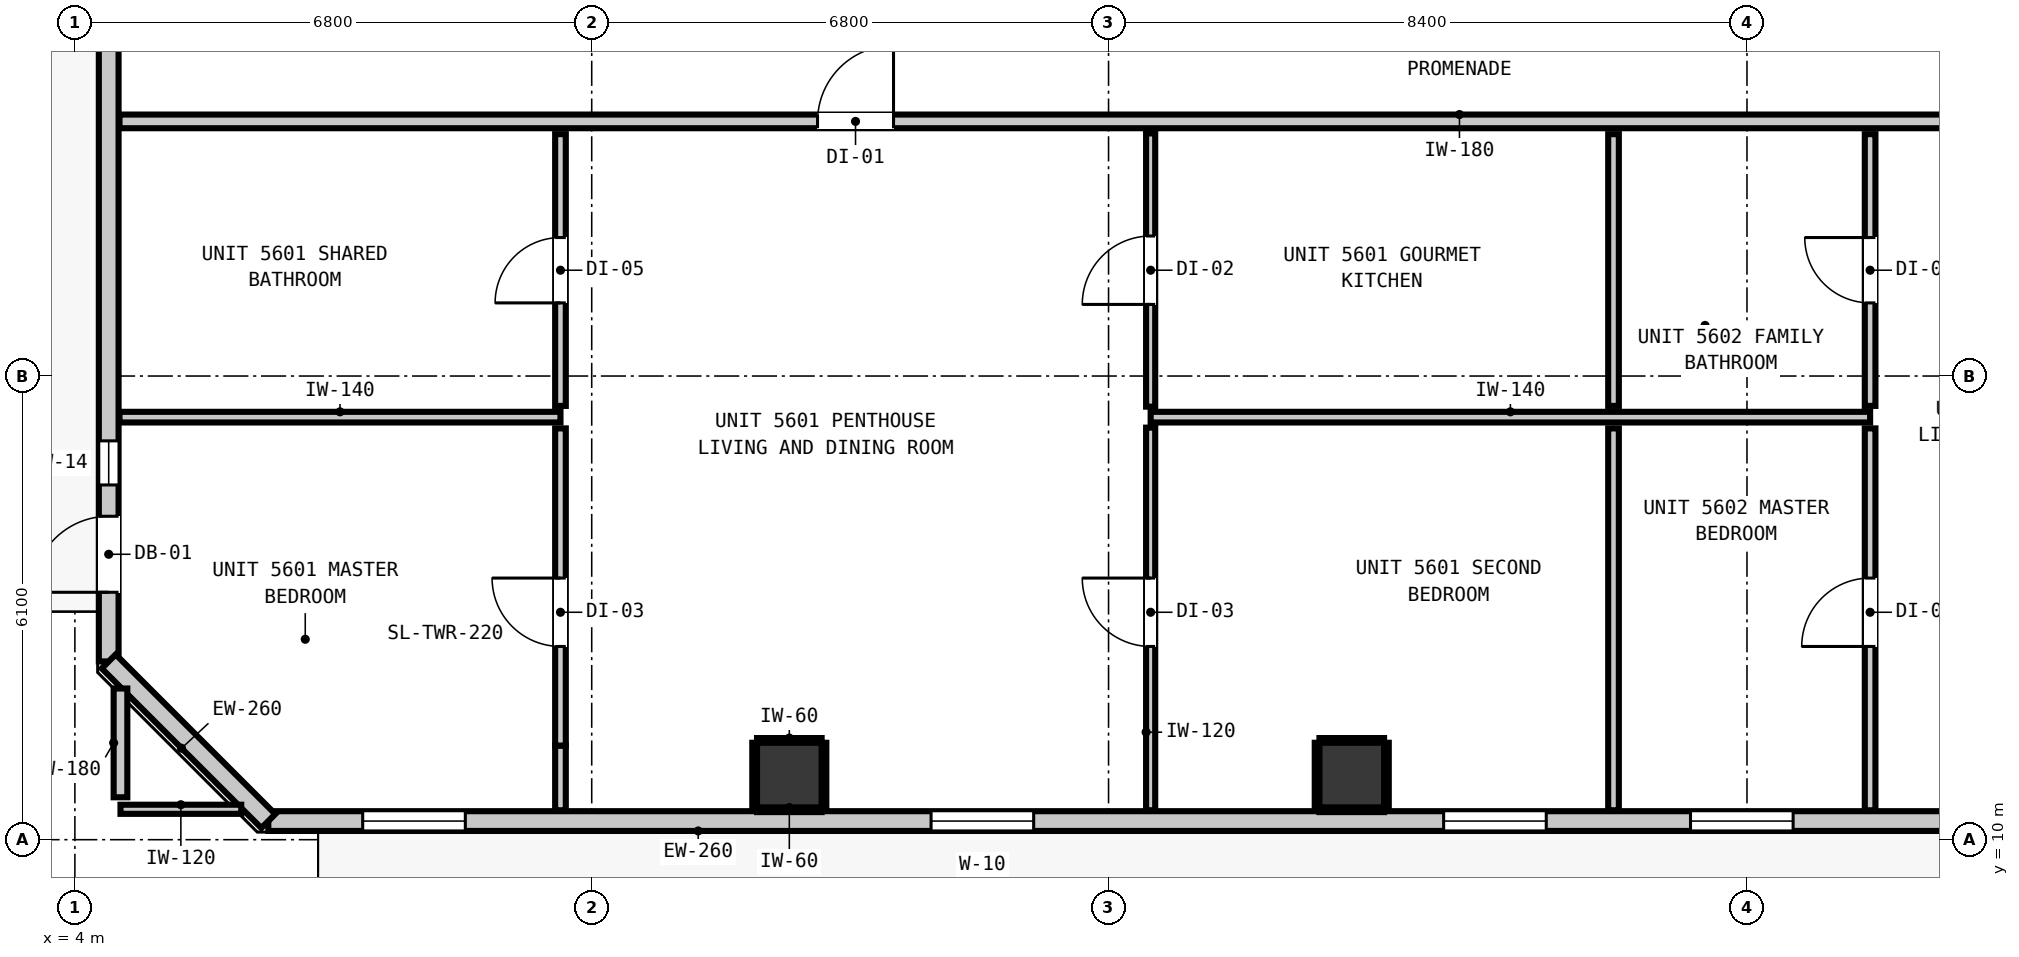
"""IFC4 building model, lengths in metres.
Left out: names, types, materials, properties, quantities, classifications, styles, units other than length and angle.
Written with IfcOpenShell. Run it as: python <this file> out.ifc"""

import sys

from ifc_helpers import new_model, si_unit, direction, frame, frame_2d, origin, origin_2d, place, context, subcontext, project, spatial, rectangle, extrude, element, fill, save


model = new_model("IFC4")
c1 = context("Model", 3, precision=1e-05, world=origin(), true_north=direction((0.0, 1.0)))
c2 = subcontext(c1, "Body", "Model", "MODEL_VIEW")
j1 = project(units=[si_unit("LENGTHUNIT", "METRE"), si_unit("PLANEANGLEUNIT", "RADIAN")], contexts=[c1])
p1 = place(None, origin())
s1 = spatial("IfcSite", under=j1, at=p1, CompositionType="ELEMENT")
p2 = place(p1, origin())
s2 = spatial("IfcBuilding", under=s1, at=p2, CompositionType="ELEMENT")
p3 = place(p2, frame((0.0, 0.0, 193.48)))
s3 = spatial("IfcBuildingStorey", under=s2, at=p3, CompositionType="ELEMENT", Elevation=193.48)
for number, where, z_axis, x_axis in (
    (1, (13.4, 10.85, 0.0), (0.0, 0.0, 1.0), (1.0, 0.0, 0.0)),
    (2, (20.8, 10.85, 0.0), (0.0, 0.0, 1.0), (1.0, 0.0, 0.0)),
):
    element("IfcColumn", number, at=place(p3, frame(where, z_axis=z_axis, x_axis=x_axis)), inside=s3, PredefinedType="COLUMN", context=c2, shape_type="SweptSolid", body=[
        extrude(rectangle(XDim=0.85, YDim=0.85, at=origin_2d()), origin(), (0.0, 0.0, 1.0), 3.32),
    ])
p4 = place(p3, frame((4.445, 12.345, 0.0), z_axis=(0.0, 0.0, 1.0), x_axis=(0.0, 1.0, 0.0)))
e3 = element("IfcWall", 3, at=p4, inside=s3, PredefinedType="STANDARD", context=c2, shape_type="SweptSolid", body=[
    extrude(rectangle(XDim=30.31, YDim=0.26, at=frame_2d((15.155, 0.0))), origin(), (0.0, 0.0, 1.0), 3.1),
])
p5 = place(p4, frame((0.91, 0.0, 0.0)))
e4 = element("IfcOpeningElement", 4, at=p5, cuts=e3, PredefinedType="OPENING", context=c2, shape_type="SweptSolid", body=[
    extrude(rectangle(XDim=1.0, YDim=2.15, at=frame_2d((0.5, 1.075))), frame((0.0, 0.14, 0.0), z_axis=(0.0, -1.0, 0.0), x_axis=(1.0, 0.0, 0.0)), (0.0, 0.0, 1.0), 0.28),
])
p6 = place(p4, frame((2.322, 0.0, 0.85)))
e5 = element("IfcOpeningElement", 5, at=p6, cuts=e3, PredefinedType="OPENING", context=c2, shape_type="SweptSolid", body=[
    extrude(rectangle(XDim=0.58, YDim=1.5, at=frame_2d((0.29, 0.75))), frame((0.0, 0.14, 0.0), z_axis=(0.0, -1.0, 0.0), x_axis=(1.0, 0.0, 0.0)), (0.0, 0.0, 1.0), 0.28),
])
p7 = place(p3, frame((39.255, 10.245, 0.0), z_axis=(0.0, 0.0, 1.0), x_axis=(-1.0, 0.0, 0.0)))
e6 = element("IfcWall", 6, at=p7, inside=s3, PredefinedType="STANDARD", context=c2, shape_type="SweptSolid", body=[
    extrude(rectangle(XDim=32.71, YDim=0.26, at=frame_2d((16.355, 0.0))), origin(), (0.0, 0.0, 1.0), 3.1),
])
p8 = place(p7, frame((3.721, 0.0, 0.0)))
e7 = element("IfcOpeningElement", 7, at=p8, cuts=e6, PredefinedType="OPENING", context=c2, shape_type="SweptSolid", body=[
    extrude(rectangle(XDim=1.0, YDim=2.15, at=frame_2d((0.5, 1.075))), frame((0.0, 0.14, 0.0), z_axis=(0.0, -1.0, 0.0), x_axis=(1.0, 0.0, 0.0)), (0.0, 0.0, 1.0), 0.28),
])
p9 = place(p7, frame((22.64, 0.0, 0.85)))
e8 = element("IfcOpeningElement", 8, at=p9, cuts=e6, PredefinedType="OPENING", context=c2, shape_type="SweptSolid", body=[
    extrude(rectangle(XDim=1.35, YDim=1.85, at=frame_2d((0.675, 0.925))), frame((0.0, 0.14, 0.0), z_axis=(0.0, -1.0, 0.0), x_axis=(1.0, 0.0, 0.0)), (0.0, 0.0, 1.0), 0.28),
])
p10 = place(p7, frame((30.118, 0.0, 0.85)))
e9 = element("IfcOpeningElement", 9, at=p10, cuts=e6, PredefinedType="OPENING", context=c2, shape_type="SweptSolid", body=[
    extrude(rectangle(XDim=1.35, YDim=1.85, at=frame_2d((0.675, 0.925))), frame((0.0, 0.14, 0.0), z_axis=(0.0, -1.0, 0.0), x_axis=(1.0, 0.0, 0.0)), (0.0, 0.0, 1.0), 0.28),
])
p11 = place(p7, frame((15.896, 0.0, 0.85)))
e10 = element("IfcOpeningElement", 10, at=p11, cuts=e6, PredefinedType="OPENING", context=c2, shape_type="SweptSolid", body=[
    extrude(rectangle(XDim=1.35, YDim=1.85, at=frame_2d((0.675, 0.925))), frame((0.0, 0.14, 0.0), z_axis=(0.0, -1.0, 0.0), x_axis=(1.0, 0.0, 0.0)), (0.0, 0.0, 1.0), 0.28),
])
p12 = place(p7, frame((7.464, 0.0, 0.85)))
e11 = element("IfcOpeningElement", 11, at=p12, cuts=e6, PredefinedType="OPENING", context=c2, shape_type="SweptSolid", body=[
    extrude(rectangle(XDim=1.35, YDim=1.85, at=frame_2d((0.675, 0.925))), frame((0.0, 0.14, 0.0), z_axis=(0.0, -1.0, 0.0), x_axis=(1.0, 0.0, 0.0)), (0.0, 0.0, 1.0), 0.28),
])
p13 = place(p7, frame((12.648, 0.0, 0.85)))
e12 = element("IfcOpeningElement", 12, at=p13, cuts=e6, PredefinedType="OPENING", context=c2, shape_type="SweptSolid", body=[
    extrude(rectangle(XDim=1.35, YDim=1.85, at=frame_2d((0.675, 0.925))), frame((0.0, 0.14, 0.0), z_axis=(0.0, -1.0, 0.0), x_axis=(1.0, 0.0, 0.0)), (0.0, 0.0, 1.0), 0.28),
])
p14 = place(p7, frame((5.159, 0.0, 0.85)))
e13 = element("IfcOpeningElement", 13, at=p14, cuts=e6, PredefinedType="OPENING", context=c2, shape_type="SweptSolid", body=[
    extrude(rectangle(XDim=1.05, YDim=1.65, at=frame_2d((0.525, 0.825))), frame((0.0, 0.14, 0.0), z_axis=(0.0, -1.0, 0.0), x_axis=(1.0, 0.0, 0.0)), (0.0, 0.0, 1.0), 0.28),
])
p15 = place(p7, frame((0.293, 0.0, 0.85)))
e14 = element("IfcOpeningElement", 14, at=p15, cuts=e6, PredefinedType="OPENING", context=c2, shape_type="SweptSolid", body=[
    extrude(rectangle(XDim=0.58, YDim=1.5, at=frame_2d((0.29, 0.75))), frame((0.0, 0.14, 0.0), z_axis=(0.0, -1.0, 0.0), x_axis=(1.0, 0.0, 0.0)), (0.0, 0.0, 1.0), 0.28),
])
p16 = place(p3, frame((6.545, 10.245, 0.0), z_axis=(0.0, 0.0, 1.0), x_axis=(-0.707106781187, 0.707106781187, 0.0)))
e15 = element("IfcWall", 15, at=p16, inside=s3, PredefinedType="STANDARD", context=c2, shape_type="SweptSolid", body=[
    extrude(rectangle(XDim=2.97, YDim=0.26, at=frame_2d((1.485, 0.0))), origin(), (0.0, 0.0, 1.0), 3.1),
])
p17 = place(p3, frame((4.587, 19.45, 0.0), z_axis=(0.0, 0.0, 1.0), x_axis=(1.0, 0.0, 0.0)))
e16 = element("IfcWall", 16, at=p17, inside=s3, PredefinedType="PARTITIONING", context=c2, shape_type="SweptSolid", body=[
    extrude(rectangle(XDim=36.626, YDim=0.18, at=frame_2d((18.313, 0.0))), origin(), (0.0, 0.0, 1.0), 3.1),
])
p18 = place(p17, frame((9.184, 0.0, 0.0)))
e17 = element("IfcOpeningElement", 17, at=p18, cuts=e16, PredefinedType="OPENING", context=c2, shape_type="SweptSolid", body=[
    extrude(rectangle(XDim=1.0, YDim=2.15, at=frame_2d((0.5, 1.075))), frame((0.0, 0.1, 0.0), z_axis=(0.0, -1.0, 0.0), x_axis=(1.0, 0.0, 0.0)), (0.0, 0.0, 1.0), 0.2),
])
p19 = place(p17, frame((25.076, 0.0, 0.0)))
e18 = element("IfcOpeningElement", 18, at=p19, cuts=e16, PredefinedType="OPENING", context=c2, shape_type="SweptSolid", body=[
    extrude(rectangle(XDim=1.0, YDim=2.15, at=frame_2d((0.5, 1.075))), frame((0.0, 0.1, 0.0), z_axis=(0.0, -1.0, 0.0), x_axis=(1.0, 0.0, 0.0)), (0.0, 0.0, 1.0), 0.2),
])
p20 = place(p3, frame((4.587, 15.559, 0.0), z_axis=(0.0, 0.0, 1.0), x_axis=(1.0, 0.0, 0.0)))
e19 = element("IfcWall", 19, at=p20, inside=s3, PredefinedType="PARTITIONING", context=c2, shape_type="SweptSolid", body=[
    extrude(rectangle(XDim=5.802, YDim=0.14, at=frame_2d((2.901, 0.0))), origin(), (0.0, 0.0, 1.0), 3.1),
])
p21 = place(p3, frame((18.154, 15.559, 0.0), z_axis=(0.0, 0.0, 1.0), x_axis=(1.0, 0.0, 0.0)))
e20 = element("IfcWall", 20, at=p21, inside=s3, PredefinedType="PARTITIONING", context=c2, shape_type="SweptSolid", body=[
    extrude(rectangle(XDim=9.466, YDim=0.14, at=frame_2d((4.733, 0.0))), origin(), (0.0, 0.0, 1.0), 3.1),
])
p22 = place(p3, frame((4.6, 10.4, 0.0), z_axis=(0.0, 0.0, 1.0), x_axis=(1.0, 0.0, 0.0)))
e21 = element("IfcWall", 21, at=p22, inside=s3, PredefinedType="PARTITIONING", context=c2, shape_type="SweptSolid", body=[
    extrude(rectangle(XDim=1.589, YDim=0.12, at=frame_2d((0.794, 0.0))), origin(), (0.0, 0.0, 1.0), 3.1),
])
p23 = place(p3, frame((4.6, 10.558, 0.0), z_axis=(0.0, 0.0, 1.0), x_axis=(0.0, 1.0, 0.0)))
e22 = element("IfcWall", 22, at=p23, inside=s3, PredefinedType="PARTITIONING", context=c2, shape_type="SweptSolid", body=[
    extrude(rectangle(XDim=1.431, YDim=0.18, at=frame_2d((0.715, 0.0))), origin(), (0.0, 0.0, 1.0), 3.1),
])
p24 = place(p3, frame((10.389, 10.387, 0.0), z_axis=(0.0, 0.0, 1.0), x_axis=(0.0, 1.0, 0.0)))
e23 = element("IfcWall", 23, at=p24, inside=s3, PredefinedType="PARTITIONING", context=c2, shape_type="SweptSolid", body=[
    extrude(rectangle(XDim=0.851, YDim=0.14, at=frame_2d((0.426, 0.0))), origin(), (0.0, 0.0, 1.0), 3.1),
])
p25 = place(p3, frame((10.389, 11.238, 0.0), z_axis=(0.0, 0.0, 1.0), x_axis=(0.0, 1.0, 0.0)))
e24 = element("IfcWall", 24, at=p25, inside=s3, PredefinedType="PARTITIONING", context=c2, shape_type="SweptSolid", body=[
    extrude(rectangle(XDim=4.173, YDim=0.14, at=frame_2d((2.086, 0.0))), origin(), (0.0, 0.0, 1.0), 2.477),
])
p26 = place(p25, frame((1.304, 0.0, 0.0)))
e25 = element("IfcOpeningElement", 25, at=p26, cuts=e24, PredefinedType="OPENING", context=c2, shape_type="SweptSolid", body=[
    extrude(rectangle(XDim=0.9, YDim=2.1, at=frame_2d((0.45, 1.05))), frame((0.0, 0.08, 0.0), z_axis=(0.0, -1.0, 0.0), x_axis=(1.0, 0.0, 0.0)), (0.0, 0.0, 1.0), 0.16),
])
p27 = place(p3, frame((10.389, 15.707, 0.0), z_axis=(0.0, 0.0, 1.0), x_axis=(0.0, 1.0, 0.0)))
e26 = element("IfcWall", 26, at=p27, inside=s3, PredefinedType="PARTITIONING", context=c2, shape_type="SweptSolid", body=[
    extrude(rectangle(XDim=3.575, YDim=0.14, at=frame_2d((1.788, 0.0))), origin(), (0.0, 0.0, 1.0), 3.1),
])
p28 = place(p27, frame((1.355, 0.0, 0.0)))
e27 = element("IfcOpeningElement", 27, at=p28, cuts=e26, PredefinedType="OPENING", context=c2, shape_type="SweptSolid", body=[
    extrude(rectangle(XDim=0.86, YDim=2.02, at=frame_2d((0.43, 1.01))), frame((0.0, 0.08, 0.0), z_axis=(0.0, -1.0, 0.0), x_axis=(1.0, 0.0, 0.0)), (0.0, 0.0, 1.0), 0.16),
])
p29 = place(p3, frame((24.244, 10.387, 0.0), z_axis=(0.0, 0.0, 1.0), x_axis=(0.0, 1.0, 0.0)))
e28 = element("IfcWall", 28, at=p29, inside=s3, PredefinedType="PARTITIONING", context=c2, shape_type="SweptSolid", body=[
    extrude(rectangle(XDim=5.024, YDim=0.14, at=frame_2d((2.512, 0.0))), origin(), (0.0, 0.0, 1.0), 3.1),
])
p30 = place(p3, frame((24.244, 15.707, 0.0), z_axis=(0.0, 0.0, 1.0), x_axis=(0.0, 1.0, 0.0)))
e29 = element("IfcWall", 29, at=p30, inside=s3, PredefinedType="PARTITIONING", context=c2, shape_type="SweptSolid", body=[
    extrude(rectangle(XDim=3.575, YDim=0.14, at=frame_2d((1.788, 0.0))), origin(), (0.0, 0.0, 1.0), 3.1),
])
p31 = place(p3, frame((27.62, 10.387, 0.0), z_axis=(0.0, 0.0, 1.0), x_axis=(0.0, 1.0, 0.0)))
e30 = element("IfcWall", 30, at=p31, inside=s3, PredefinedType="PARTITIONING", context=c2, shape_type="SweptSolid", body=[
    extrude(rectangle(XDim=5.024, YDim=0.14, at=frame_2d((2.512, 0.0))), origin(), (0.0, 0.0, 1.0), 3.1),
])
p32 = place(p31, frame((2.155, 0.0, 0.0)))
e31 = element("IfcOpeningElement", 31, at=p32, cuts=e30, PredefinedType="OPENING", context=c2, shape_type="SweptSolid", body=[
    extrude(rectangle(XDim=0.9, YDim=2.1, at=frame_2d((0.45, 1.05))), frame((0.0, 0.08, 0.0), z_axis=(0.0, -1.0, 0.0), x_axis=(1.0, 0.0, 0.0)), (0.0, 0.0, 1.0), 0.16),
])
p33 = place(p3, frame((27.62, 15.707, 0.0), z_axis=(0.0, 0.0, 1.0), x_axis=(0.0, 1.0, 0.0)))
e32 = element("IfcWall", 32, at=p33, inside=s3, PredefinedType="PARTITIONING", context=c2, shape_type="SweptSolid", body=[
    extrude(rectangle(XDim=3.575, YDim=0.14, at=frame_2d((1.788, 0.0))), origin(), (0.0, 0.0, 1.0), 3.1),
])
p34 = place(p33, frame((1.355, 0.0, 0.0)))
e33 = element("IfcOpeningElement", 33, at=p34, cuts=e32, PredefinedType="OPENING", context=c2, shape_type="SweptSolid", body=[
    extrude(rectangle(XDim=0.86, YDim=2.02, at=frame_2d((0.43, 1.01))), frame((0.0, 0.08, 0.0), z_axis=(0.0, -1.0, 0.0), x_axis=(1.0, 0.0, 0.0)), (0.0, 0.0, 1.0), 0.16),
])
p35 = place(p3, frame((18.154, 10.387, 0.0), z_axis=(0.0, 0.0, 1.0), x_axis=(0.0, 1.0, 0.0)))
e34 = element("IfcWall", 34, at=p35, inside=s3, PredefinedType="PARTITIONING", context=c2, shape_type="SweptSolid", body=[
    extrude(rectangle(XDim=5.034, YDim=0.12, at=frame_2d((2.517, 0.0))), origin(), (0.0, 0.0, 1.0), 3.1),
])
p36 = place(p35, frame((2.155, 0.0, 0.0)))
e35 = element("IfcOpeningElement", 35, at=p36, cuts=e34, PredefinedType="OPENING", context=c2, shape_type="SweptSolid", body=[
    extrude(rectangle(XDim=0.9, YDim=2.1, at=frame_2d((0.45, 1.05))), frame((0.0, 0.07, 0.0), z_axis=(0.0, -1.0, 0.0), x_axis=(1.0, 0.0, 0.0)), (0.0, 0.0, 1.0), 0.14),
])
p37 = place(p3, frame((18.154, 15.697, 0.0), z_axis=(0.0, 0.0, 1.0), x_axis=(0.0, 1.0, 0.0)))
e36 = element("IfcWall", 36, at=p37, inside=s3, PredefinedType="PARTITIONING", context=c2, shape_type="SweptSolid", body=[
    extrude(rectangle(XDim=3.595, YDim=0.12, at=frame_2d((1.797, 0.0))), origin(), (0.0, 0.0, 1.0), 3.1),
])
p38 = place(p37, frame((1.345, 0.0, 0.0)))
e37 = element("IfcOpeningElement", 37, at=p38, cuts=e36, PredefinedType="OPENING", context=c2, shape_type="SweptSolid", body=[
    extrude(rectangle(XDim=0.9, YDim=2.1, at=frame_2d((0.45, 1.05))), frame((0.0, 0.07, 0.0), z_axis=(0.0, -1.0, 0.0), x_axis=(1.0, 0.0, 0.0)), (0.0, 0.0, 1.0), 0.14),
])
for number, where, z_axis, x_axis in (
    (38, (12.975, 10.393, 0.0), (0.0, 0.0, 1.0), (1.0, 0.0, 0.0)),
    (39, (12.975, 11.307, 0.0), (0.0, 0.0, 1.0), (1.0, 0.0, 0.0)),
    (40, (12.943, 10.425, 0.0), (0.0, 0.0, 1.0), (0.0, 1.0, 0.0)),
    (41, (13.857, 10.425, 0.0), (0.0, 0.0, 1.0), (0.0, 1.0, 0.0)),
):
    element("IfcWall", number, at=place(p3, frame(where, z_axis=z_axis, x_axis=x_axis)), inside=s3, PredefinedType="PARTITIONING", context=c2, shape_type="SweptSolid", body=[
        extrude(rectangle(XDim=0.85, YDim=0.06, at=frame_2d((0.425, 0.0))), origin(), (0.0, 0.0, 1.0), 1.45),
    ])
for number, where, z_axis, x_axis in (
    (42, (20.375, 10.393, 0.0), (0.0, 0.0, 1.0), (1.0, 0.0, 0.0)),
    (43, (20.375, 11.307, 0.0), (0.0, 0.0, 1.0), (1.0, 0.0, 0.0)),
):
    element("IfcWall", number, at=place(p3, frame(where, z_axis=z_axis, x_axis=x_axis)), inside=s3, PredefinedType="PARTITIONING", context=c2, shape_type="SweptSolid", body=[
        extrude(rectangle(XDim=0.85, YDim=0.06, at=frame_2d((0.425, 0.0))), origin(), (0.0, 0.0, 1.0), 1.45),
    ])
for number, where, z_axis, x_axis in (
    (44, (20.343, 10.425, 0.0), (0.0, 0.0, 1.0), (0.0, 1.0, 0.0)),
    (45, (21.257, 10.425, 0.0), (0.0, 0.0, 1.0), (0.0, 1.0, 0.0)),
):
    element("IfcWall", number, at=place(p3, frame(where, z_axis=z_axis, x_axis=x_axis)), inside=s3, PredefinedType="PARTITIONING", context=c2, shape_type="SweptSolid", body=[
        extrude(rectangle(XDim=0.85, YDim=0.06, at=frame_2d((0.425, 0.0))), origin(), (0.0, 0.0, 1.0), 1.45),
    ])
p39 = place(p5, origin())
e46 = element("IfcDoor", 46, at=p39, inside=s3, OperationType="SINGLE_SWING_LEFT", PredefinedType="DOOR", context=c2, shape_type="SweptSolid", body=[
    extrude(rectangle(XDim=1.0, YDim=2.15, at=frame_2d((0.5, 1.075))), frame((0.0, 0.025, 0.0), z_axis=(0.0, -1.0, 0.0), x_axis=(1.0, 0.0, 0.0)), (0.0, 0.0, 1.0), 0.05),
])
fill(e4, e46)
p40 = place(p6, origin())
e47 = element("IfcWindow", 47, at=p40, inside=s3, PartitioningType="SINGLE_PANEL", PredefinedType="WINDOW", context=c2, shape_type="SweptSolid", body=[
    extrude(rectangle(XDim=0.58, YDim=1.5, at=frame_2d((0.29, 0.75))), frame((0.0, 0.03, 0.0), z_axis=(0.0, -1.0, 0.0), x_axis=(1.0, 0.0, 0.0)), (0.0, 0.0, 1.0), 0.06),
])
fill(e5, e47)
p41 = place(p9, origin())
e48 = element("IfcWindow", 48, at=p41, inside=s3, PartitioningType="SINGLE_PANEL", PredefinedType="WINDOW", context=c2, shape_type="SweptSolid", body=[
    extrude(rectangle(XDim=1.35, YDim=1.85, at=frame_2d((0.675, 0.925))), frame((0.0, 0.03, 0.0), z_axis=(0.0, -1.0, 0.0), x_axis=(1.0, 0.0, 0.0)), (0.0, 0.0, 1.0), 0.06),
])
fill(e8, e48)
p42 = place(p10, origin())
e49 = element("IfcWindow", 49, at=p42, inside=s3, PartitioningType="SINGLE_PANEL", PredefinedType="WINDOW", context=c2, shape_type="SweptSolid", body=[
    extrude(rectangle(XDim=1.35, YDim=1.85, at=frame_2d((0.675, 0.925))), frame((0.0, 0.03, 0.0), z_axis=(0.0, -1.0, 0.0), x_axis=(1.0, 0.0, 0.0)), (0.0, 0.0, 1.0), 0.06),
])
fill(e9, e49)
p43 = place(p11, origin())
e50 = element("IfcWindow", 50, at=p43, inside=s3, PartitioningType="SINGLE_PANEL", PredefinedType="WINDOW", context=c2, shape_type="SweptSolid", body=[
    extrude(rectangle(XDim=1.35, YDim=1.85, at=frame_2d((0.675, 0.925))), frame((0.0, 0.03, 0.0), z_axis=(0.0, -1.0, 0.0), x_axis=(1.0, 0.0, 0.0)), (0.0, 0.0, 1.0), 0.06),
])
fill(e10, e50)
p44 = place(p13, origin())
e51 = element("IfcWindow", 51, at=p44, inside=s3, PartitioningType="SINGLE_PANEL", PredefinedType="WINDOW", context=c2, shape_type="SweptSolid", body=[
    extrude(rectangle(XDim=1.35, YDim=1.85, at=frame_2d((0.675, 0.925))), frame((0.0, 0.03, 0.0), z_axis=(0.0, -1.0, 0.0), x_axis=(1.0, 0.0, 0.0)), (0.0, 0.0, 1.0), 0.06),
])
fill(e12, e51)
p45 = place(p18, origin())
e52 = element("IfcDoor", 52, at=p45, inside=s3, OperationType="SINGLE_SWING_RIGHT", PredefinedType="DOOR", context=c2, shape_type="SweptSolid", body=[
    extrude(rectangle(XDim=1.0, YDim=2.15, at=frame_2d((0.5, 1.075))), frame((0.0, 0.025, 0.0), z_axis=(0.0, -1.0, 0.0), x_axis=(1.0, 0.0, 0.0)), (0.0, 0.0, 1.0), 0.05),
])
fill(e17, e52)
p46 = place(p28, origin())
e53 = element("IfcDoor", 53, at=p46, inside=s3, OperationType="SINGLE_SWING_LEFT", PredefinedType="DOOR", context=c2, shape_type="SweptSolid", body=[
    extrude(rectangle(XDim=0.86, YDim=2.02, at=frame_2d((0.43, 1.01))), frame((0.0, 0.025, 0.0), z_axis=(0.0, -1.0, 0.0), x_axis=(1.0, 0.0, 0.0)), (0.0, 0.0, 1.0), 0.05),
])
fill(e27, e53)
p47 = place(p26, origin())
e54 = element("IfcDoor", 54, at=p47, inside=s3, OperationType="SINGLE_SWING_RIGHT", PredefinedType="DOOR", context=c2, shape_type="SweptSolid", body=[
    extrude(rectangle(XDim=0.9, YDim=2.1, at=frame_2d((0.45, 1.05))), frame((0.0, 0.025, 0.0), z_axis=(0.0, -1.0, 0.0), x_axis=(1.0, 0.0, 0.0)), (0.0, 0.0, 1.0), 0.05),
])
fill(e25, e54)
p48 = place(p38, origin())
e55 = element("IfcDoor", 55, at=p48, inside=s3, OperationType="SINGLE_SWING_LEFT", PredefinedType="DOOR", context=c2, shape_type="SweptSolid", body=[
    extrude(rectangle(XDim=0.9, YDim=2.1, at=frame_2d((0.45, 1.05))), frame((0.0, 0.025, 0.0), z_axis=(0.0, -1.0, 0.0), x_axis=(1.0, 0.0, 0.0)), (0.0, 0.0, 1.0), 0.05),
])
fill(e37, e55)
p49 = place(p36, origin())
e56 = element("IfcDoor", 56, at=p49, inside=s3, OperationType="SINGLE_SWING_RIGHT", PredefinedType="DOOR", context=c2, shape_type="SweptSolid", body=[
    extrude(rectangle(XDim=0.9, YDim=2.1, at=frame_2d((0.45, 1.05))), frame((0.0, 0.025, 0.0), z_axis=(0.0, -1.0, 0.0), x_axis=(1.0, 0.0, 0.0)), (0.0, 0.0, 1.0), 0.05),
])
fill(e35, e56)
p50 = place(p34, origin())
e57 = element("IfcDoor", 57, at=p50, inside=s3, OperationType="SINGLE_SWING_RIGHT", PredefinedType="DOOR", context=c2, shape_type="SweptSolid", body=[
    extrude(rectangle(XDim=0.86, YDim=2.02, at=frame_2d((0.43, 1.01))), frame((0.0, 0.025, 0.0), z_axis=(0.0, -1.0, 0.0), x_axis=(1.0, 0.0, 0.0)), (0.0, 0.0, 1.0), 0.05),
])
fill(e33, e57)
p51 = place(p32, origin())
e58 = element("IfcDoor", 58, at=p51, inside=s3, OperationType="SINGLE_SWING_LEFT", PredefinedType="DOOR", context=c2, shape_type="SweptSolid", body=[
    extrude(rectangle(XDim=0.9, YDim=2.1, at=frame_2d((0.45, 1.05))), frame((0.0, 0.025, 0.0), z_axis=(0.0, -1.0, 0.0), x_axis=(1.0, 0.0, 0.0)), (0.0, 0.0, 1.0), 0.05),
])
fill(e31, e58)
save(model, sys.argv[1])
